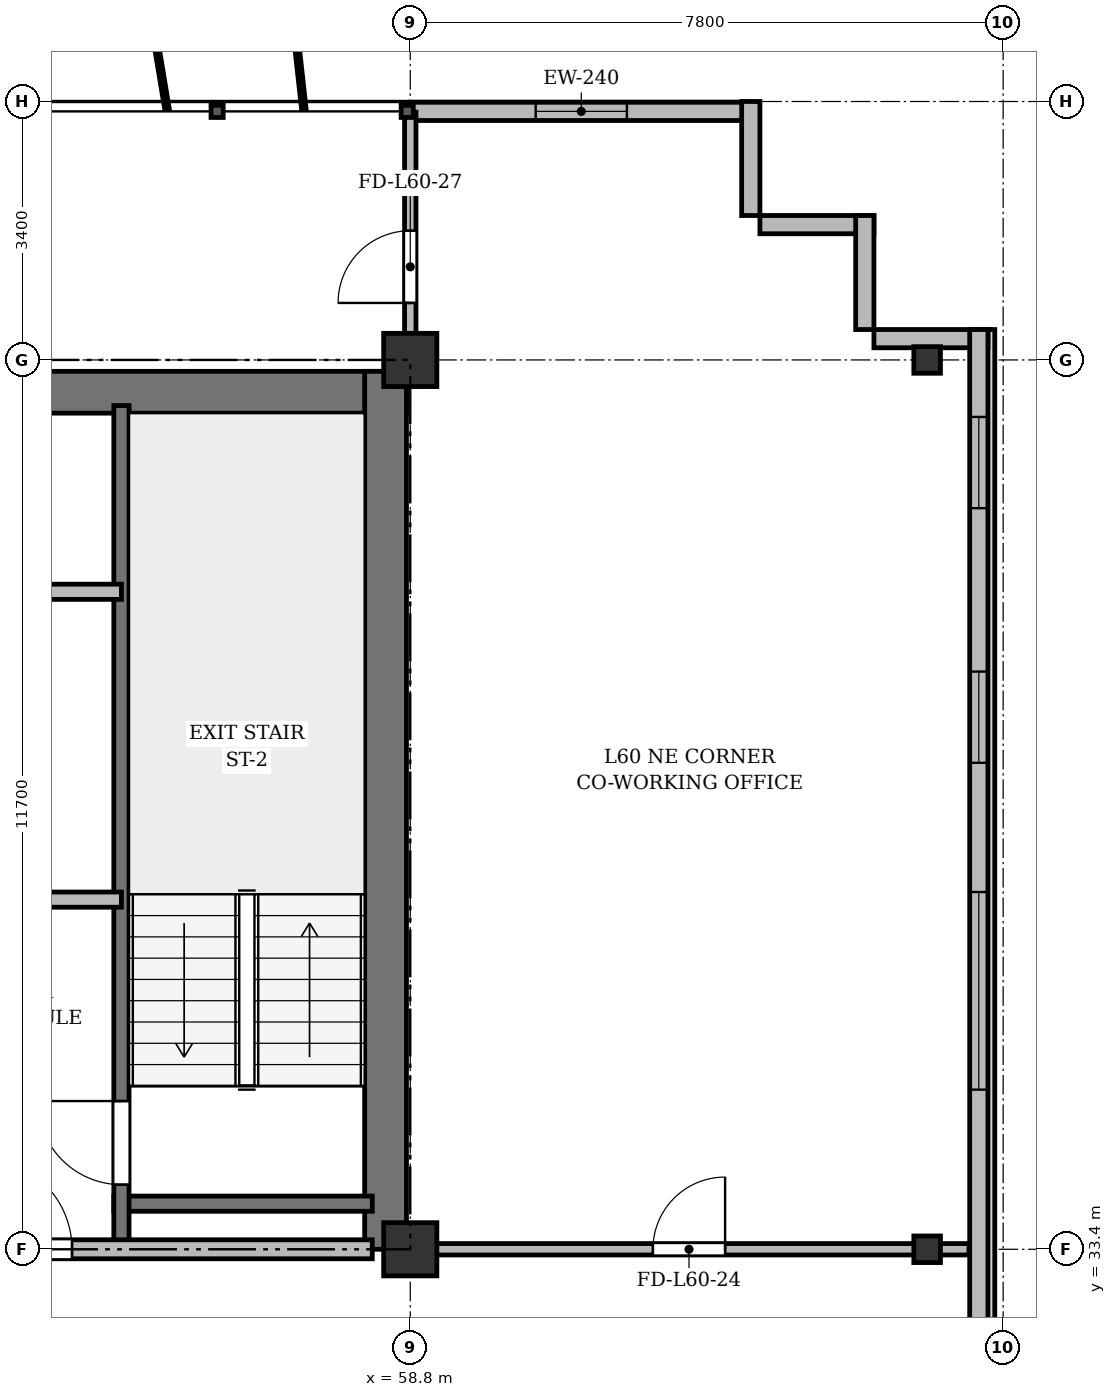
"""IFC4 building model, lengths in metres.
Left out: names, types, materials, properties, quantities, classifications, styles, units other than length and angle.
Written with IfcOpenShell. Run it as: python <this file> out.ifc"""

import sys

from ifc_helpers import new_model, si_unit, direction, frame, frame_2d, origin, origin_2d, place, context, subcontext, project, spatial, rectangle, i_section, extrude, source, transform, mapped, element, fill, save


model = new_model("IFC4")
c1 = context("Model", 3, precision=1e-05, world=origin(), true_north=direction((0.0, 1.0)))
c2 = subcontext(c1, "Body", "Model", "MODEL_VIEW")
j1 = project(units=[si_unit("LENGTHUNIT", "METRE"), si_unit("PLANEANGLEUNIT", "RADIAN")], contexts=[c1])
p1 = place(None, origin())
s1 = spatial("IfcSite", under=j1, at=p1, CompositionType="ELEMENT")
p2 = place(p1, origin())
s2 = spatial("IfcBuilding", under=s1, at=p2, CompositionType="ELEMENT")
p3 = place(p2, frame((0.0, 0.0, 230.1)))
s3 = spatial("IfcBuildingStorey", under=s2, at=p3, CompositionType="ELEMENT", Elevation=230.1)
m1 = source(origin(), c2, "Body", "SweptSolid", [
    extrude(rectangle(XDim=0.7, YDim=0.7, at=origin_2d()), origin(), (0.0, 0.0, 1.0), 3.6),
])
for number, where, z_axis, x_axis in (
    (1, (58.8, 33.4, 0.0), (0.0, 0.0, 1.0), (1.0, 0.0, 0.0)),
    (2, (58.8, 45.1, 0.0), (0.0, 0.0, 1.0), (1.0, 0.0, 0.0)),
):
    element("IfcColumn", number, at=place(p3, frame(where, z_axis=z_axis, x_axis=x_axis)), inside=s3, PredefinedType="COLUMN", context=c2, shape_type="MappedRepresentation", body=[
        mapped(m1, transform((0.0, 0.0, 0.0), x_axis=(1.0, 0.0, 0.0), y_axis=(0.0, 1.0, 0.0), z_axis=(0.0, 0.0, 1.0), scale=1.0)),
    ])
m2 = source(origin(), c2, "Body", "SweptSolid", [
    extrude(i_section(OverallWidth=0.35, OverallDepth=0.35, WebThickness=0.018, FlangeThickness=0.028, at=origin_2d()), origin(), (0.0, 0.0, 1.0), 3.6),
])
for number, where, z_axis, x_axis in (
    (3, (65.6, 33.4, 0.0), (0.0, 0.0, 1.0), (1.0, 0.0, 0.0)),
    (4, (65.6, 45.1, 0.0), (0.0, 0.0, 1.0), (1.0, 0.0, 0.0)),
):
    element("IfcColumn", number, at=place(p3, frame(where, z_axis=z_axis, x_axis=x_axis)), inside=s3, PredefinedType="COLUMN", context=c2, shape_type="MappedRepresentation", body=[
        mapped(m2, transform((0.0, 0.0, 0.0), x_axis=(1.0, 0.0, 0.0), y_axis=(0.0, 1.0, 0.0), z_axis=(0.0, 0.0, 1.0), scale=1.0)),
    ])
p4 = place(p3, frame((58.8, 48.37, 0.0), z_axis=(0.0, 0.0, 1.0), x_axis=(1.0, 0.0, 0.0)))
e5 = element("IfcWall", 5, at=p4, inside=s3, PredefinedType="SOLIDWALL", context=c2, shape_type="SweptSolid", body=[
    extrude(rectangle(XDim=4.5, YDim=0.24, at=frame_2d((2.25, 0.0))), origin(), (0.0, 0.0, 1.0), 3.36),
])
p5 = place(p4, frame((1.65, 0.0, 0.9)))
e6 = element("IfcOpeningElement", 6, at=p5, cuts=e5, PredefinedType="OPENING", context=c2, shape_type="SweptSolid", body=[
    extrude(rectangle(XDim=1.2, YDim=1.65, at=frame_2d((0.6, 0.825))), frame((0.0, 0.13, 0.0), z_axis=(0.0, -1.0, 0.0), x_axis=(1.0, 0.0, 0.0)), (0.0, 0.0, 1.0), 0.26),
])
for number, where, z_axis, x_axis in (
    (7, (63.28, 48.5, 0.0), (0.0, 0.0, 1.0), (0.0, -1.0, 0.0)),
    (8, (63.4, 46.88, 0.0), (0.0, 0.0, 1.0), (1.0, 0.0, 0.0)),
    (9, (64.78, 47.0, 0.0), (0.0, 0.0, 1.0), (0.0, -1.0, 0.0)),
    (10, (64.9, 45.38, 0.0), (0.0, 0.0, 1.0), (1.0, 0.0, 0.0)),
):
    element("IfcWall", number, at=place(p3, frame(where, z_axis=z_axis, x_axis=x_axis)), inside=s3, PredefinedType="SOLIDWALL", context=c2, shape_type="SweptSolid", body=[
        extrude(rectangle(XDim=1.5, YDim=0.24, at=frame_2d((0.75, 0.0))), origin(), (0.0, 0.0, 1.0), 3.36),
    ])
p6 = place(p3, frame((66.28, 45.5, 0.0), z_axis=(0.0, 0.0, 1.0), x_axis=(0.0, -1.0, 0.0)))
e11 = element("IfcWall", 11, at=p6, inside=s3, PredefinedType="SOLIDWALL", context=c2, shape_type="SweptSolid", body=[
    extrude(rectangle(XDim=39.1, YDim=0.24, at=frame_2d((19.55, 0.0))), origin(), (0.0, 0.0, 1.0), 3.36),
])
p7 = place(p6, frame((36.45, 0.0, 0.92)))
e12 = element("IfcOpeningElement", 12, at=p7, cuts=e11, PredefinedType="OPENING", context=c2, shape_type="SweptSolid", body=[
    extrude(rectangle(XDim=1.2, YDim=1.65, at=frame_2d((0.6, 0.825))), frame((0.0, 0.13, 0.0), z_axis=(0.0, -1.0, 0.0), x_axis=(1.0, 0.0, 0.0)), (0.0, 0.0, 1.0), 0.26),
])
p8 = place(p6, frame((32.8, 0.0, 0.92)))
e13 = element("IfcOpeningElement", 13, at=p8, cuts=e11, PredefinedType="OPENING", context=c2, shape_type="SweptSolid", body=[
    extrude(rectangle(XDim=2.6, YDim=1.9, at=frame_2d((1.3, 0.95))), frame((0.0, 0.13, 0.0), z_axis=(0.0, -1.0, 0.0), x_axis=(1.0, 0.0, 0.0)), (0.0, 0.0, 1.0), 0.26),
])
p9 = place(p6, frame((28.6, 0.0, 0.92)))
e14 = element("IfcOpeningElement", 14, at=p9, cuts=e11, PredefinedType="OPENING", context=c2, shape_type="SweptSolid", body=[
    extrude(rectangle(XDim=2.6, YDim=1.9, at=frame_2d((1.3, 0.95))), frame((0.0, 0.13, 0.0), z_axis=(0.0, -1.0, 0.0), x_axis=(1.0, 0.0, 0.0)), (0.0, 0.0, 1.0), 0.26),
])
p10 = place(p6, frame((21.4, 0.0, 0.92)))
e15 = element("IfcOpeningElement", 15, at=p10, cuts=e11, PredefinedType="OPENING", context=c2, shape_type="SweptSolid", body=[
    extrude(rectangle(XDim=2.6, YDim=1.9, at=frame_2d((1.3, 0.95))), frame((0.0, 0.13, 0.0), z_axis=(0.0, -1.0, 0.0), x_axis=(1.0, 0.0, 0.0)), (0.0, 0.0, 1.0), 0.26),
])
p11 = place(p6, frame((7.4, 0.0, 0.92)))
e16 = element("IfcOpeningElement", 16, at=p11, cuts=e11, PredefinedType="OPENING", context=c2, shape_type="SweptSolid", body=[
    extrude(rectangle(XDim=2.6, YDim=1.9, at=frame_2d((1.3, 0.95))), frame((0.0, 0.13, 0.0), z_axis=(0.0, -1.0, 0.0), x_axis=(1.0, 0.0, 0.0)), (0.0, 0.0, 1.0), 0.26),
])
p12 = place(p6, frame((4.5, 0.0, 0.92)))
e17 = element("IfcOpeningElement", 17, at=p12, cuts=e11, PredefinedType="OPENING", context=c2, shape_type="SweptSolid", body=[
    extrude(rectangle(XDim=1.2, YDim=1.65, at=frame_2d((0.6, 0.825))), frame((0.0, 0.13, 0.0), z_axis=(0.0, -1.0, 0.0), x_axis=(1.0, 0.0, 0.0)), (0.0, 0.0, 1.0), 0.26),
])
p13 = place(p6, frame((1.15, 0.0, 0.92)))
e18 = element("IfcOpeningElement", 18, at=p13, cuts=e11, PredefinedType="OPENING", context=c2, shape_type="SweptSolid", body=[
    extrude(rectangle(XDim=1.2, YDim=1.65, at=frame_2d((0.6, 0.825))), frame((0.0, 0.13, 0.0), z_axis=(0.0, -1.0, 0.0), x_axis=(1.0, 0.0, 0.0)), (0.0, 0.0, 1.0), 0.26),
])
p14 = place(p3, frame((15.65, 44.675, 0.0), z_axis=(0.0, 0.0, 1.0), x_axis=(1.0, 0.0, 0.0)))
e19 = element("IfcWall", 19, at=p14, inside=s3, PredefinedType="SHEAR", context=c2, shape_type="SweptSolid", body=[
    extrude(rectangle(XDim=43.1, YDim=0.55, at=frame_2d((21.55, 0.0))), origin(), (0.0, 0.0, 1.0), 3.36),
])
p15 = place(p3, frame((58.475, 33.4, 0.0), z_axis=(0.0, 0.0, 1.0), x_axis=(0.0, 1.0, 0.0)))
e20 = element("IfcWall", 20, at=p15, inside=s3, PredefinedType="SHEAR", context=c2, shape_type="SweptSolid", body=[
    extrude(rectangle(XDim=11.55, YDim=0.55, at=frame_2d((5.775, 0.0))), origin(), (0.0, 0.0, 1.0), 3.36),
])
p16 = place(p3, frame((54.9, 34.0, 0.0), z_axis=(0.0, 0.0, 1.0), x_axis=(1.0, 0.0, 0.0)))
e21 = element("IfcWall", 21, at=p16, inside=s3, PredefinedType="SHEAR", context=c2, shape_type="SweptSolid", body=[
    extrude(rectangle(XDim=3.4, YDim=0.2, at=frame_2d((1.7, 0.0))), origin(), (0.0, 0.0, 1.0), 3.36),
])
p17 = place(p3, frame((55.0, 33.4, 0.0), z_axis=(0.0, 0.0, 1.0), x_axis=(0.0, 1.0, 0.0)))
e22 = element("IfcWall", 22, at=p17, inside=s3, PredefinedType="SHEAR", context=c2, shape_type="SweptSolid", body=[
    extrude(rectangle(XDim=11.1, YDim=0.2, at=frame_2d((5.55, 0.0))), origin(), (0.0, 0.0, 1.0), 3.36),
])
p18 = place(p17, frame((0.85, 0.0, 0.0)))
e23 = element("IfcOpeningElement", 23, at=p18, cuts=e22, PredefinedType="OPENING", context=c2, shape_type="SweptSolid", body=[
    extrude(rectangle(XDim=1.1, YDim=2.15, at=frame_2d((0.55, 1.075))), frame((0.0, 0.11, 0.0), z_axis=(0.0, -1.0, 0.0), x_axis=(1.0, 0.0, 0.0)), (0.0, 0.0, 1.0), 0.22),
])
p19 = place(p3, frame((47.15, 42.05, 0.0), z_axis=(0.0, 0.0, 1.0), x_axis=(1.0, 0.0, 0.0)))
e24 = element("IfcWall", 24, at=p19, inside=s3, PredefinedType="SOLIDWALL", context=c2, shape_type="SweptSolid", body=[
    extrude(rectangle(XDim=7.85, YDim=0.2, at=frame_2d((3.925, 0.0))), origin(), (0.0, 0.0, 1.0), 2.86),
])
p20 = place(p19, frame((0.75, 0.0, 0.0)))
e25 = element("IfcOpeningElement", 25, at=p20, cuts=e24, PredefinedType="OPENING", context=c2, shape_type="SweptSolid", body=[
    extrude(rectangle(XDim=0.9, YDim=2.1, at=frame_2d((0.45, 1.05))), frame((0.0, 0.11, 0.0), z_axis=(0.0, -1.0, 0.0), x_axis=(1.0, 0.0, 0.0)), (0.0, 0.0, 1.0), 0.22),
])
p21 = place(p19, frame((3.85, 0.0, 0.0)))
e26 = element("IfcOpeningElement", 26, at=p21, cuts=e24, PredefinedType="OPENING", context=c2, shape_type="SweptSolid", body=[
    extrude(rectangle(XDim=0.9, YDim=2.1, at=frame_2d((0.45, 1.05))), frame((0.0, 0.11, 0.0), z_axis=(0.0, -1.0, 0.0), x_axis=(1.0, 0.0, 0.0)), (0.0, 0.0, 1.0), 0.22),
])
p22 = place(p3, frame((52.45, 38.0, 0.0), z_axis=(0.0, 0.0, 1.0), x_axis=(1.0, 0.0, 0.0)))
e27 = element("IfcWall", 27, at=p22, inside=s3, PredefinedType="PARTITIONING", context=c2, shape_type="SweptSolid", body=[
    extrude(rectangle(XDim=2.55, YDim=0.2, at=frame_2d((1.275, 0.0))), origin(), (0.0, 0.0, 1.0), 3.36),
])
p23 = place(p3, frame((47.15, 33.4, 0.0), z_axis=(0.0, 0.0, 1.0), x_axis=(1.0, 0.0, 0.0)))
e28 = element("IfcWall", 28, at=p23, inside=s3, PredefinedType="PARTITIONING", context=c2, shape_type="SweptSolid", body=[
    extrude(rectangle(XDim=11.15, YDim=0.25, at=frame_2d((5.575, 0.0))), origin(), (0.0, 0.0, 1.0), 2.91),
])
p24 = place(p23, frame((0.7, 0.0, 0.0)))
e29 = element("IfcOpeningElement", 29, at=p24, cuts=e28, PredefinedType="OPENING", context=c2, shape_type="SweptSolid", body=[
    extrude(rectangle(XDim=0.95, YDim=2.15, at=frame_2d((0.475, 1.075))), frame((0.0, 0.135, 0.0), z_axis=(0.0, -1.0, 0.0), x_axis=(1.0, 0.0, 0.0)), (0.0, 0.0, 1.0), 0.27),
])
p25 = place(p23, frame((6.0, 0.0, 0.0)))
e30 = element("IfcOpeningElement", 30, at=p25, cuts=e28, PredefinedType="OPENING", context=c2, shape_type="SweptSolid", body=[
    extrude(rectangle(XDim=1.2, YDim=2.15, at=frame_2d((0.6, 1.075))), frame((0.0, 0.135, 0.0), z_axis=(0.0, -1.0, 0.0), x_axis=(1.0, 0.0, 0.0)), (0.0, 0.0, 1.0), 0.27),
])
p26 = place(p3, frame((58.8, 33.4, 0.0), z_axis=(0.0, 0.0, 1.0), x_axis=(1.0, 0.0, 0.0)))
e31 = element("IfcWall", 31, at=p26, inside=s3, PredefinedType="PARTITIONING", context=c2, shape_type="SweptSolid", body=[
    extrude(rectangle(XDim=7.35, YDim=0.15, at=frame_2d((3.675, 0.0))), origin(), (0.0, 0.0, 1.0), 2.91),
])
p27 = place(p26, frame((3.192, 0.0, 0.0)))
e32 = element("IfcOpeningElement", 32, at=p27, cuts=e31, PredefinedType="OPENING", context=c2, shape_type="SweptSolid", body=[
    extrude(rectangle(XDim=0.95, YDim=2.15, at=frame_2d((0.475, 1.075))), frame((0.0, 0.085, 0.0), z_axis=(0.0, -1.0, 0.0), x_axis=(1.0, 0.0, 0.0)), (0.0, 0.0, 1.0), 0.17),
])
p28 = place(p3, frame((58.8, 44.75, 0.0), z_axis=(0.0, 0.0, 1.0), x_axis=(0.0, 1.0, 0.0)))
e33 = element("IfcWall", 33, at=p28, inside=s3, PredefinedType="PARTITIONING", context=c2, shape_type="SweptSolid", body=[
    extrude(rectangle(XDim=3.61, YDim=0.15, at=frame_2d((1.805, 0.0))), origin(), (0.0, 0.0, 1.0), 2.86),
])
p29 = place(p28, frame((1.1, 0.0, 0.0)))
e34 = element("IfcOpeningElement", 34, at=p29, cuts=e33, PredefinedType="OPENING", context=c2, shape_type="SweptSolid", body=[
    extrude(rectangle(XDim=0.95, YDim=2.15, at=frame_2d((0.475, 1.075))), frame((0.0, 0.085, 0.0), z_axis=(0.0, -1.0, 0.0), x_axis=(1.0, 0.0, 0.0)), (0.0, 0.0, 1.0), 0.17),
])
m3 = source(origin(), c2, "Body", "SweptSolid", [
    extrude(rectangle(XDim=1.2, YDim=1.65, at=frame_2d((0.6, 0.825))), frame((0.0, 0.03, 0.0), z_axis=(0.0, -1.0, 0.0), x_axis=(1.0, 0.0, 0.0)), (0.0, 0.0, 1.0), 0.06),
])
p30 = place(p5, origin())
e35 = element("IfcWindow", 35, at=p30, inside=s3, PartitioningType="SINGLE_PANEL", PredefinedType="WINDOW", context=c2, shape_type="MappedRepresentation", body=[
    mapped(m3, transform((0.0, 0.0, 0.0), x_axis=(1.0, 0.0, 0.0), y_axis=(0.0, 1.0, 0.0), z_axis=(0.0, 0.0, 1.0), scale=1.0)),
])
fill(e6, e35)
m4 = source(origin(), c2, "Body", "SweptSolid", [
    extrude(rectangle(XDim=2.6, YDim=1.9, at=frame_2d((1.3, 0.95))), frame((0.0, 0.03, 0.0), z_axis=(0.0, -1.0, 0.0), x_axis=(1.0, 0.0, 0.0)), (0.0, 0.0, 1.0), 0.06),
])
p31 = place(p11, origin())
e36 = element("IfcWindow", 36, at=p31, inside=s3, PartitioningType="SINGLE_PANEL", PredefinedType="WINDOW", context=c2, shape_type="MappedRepresentation", body=[
    mapped(m4, transform((0.0, 0.0, 0.0), x_axis=(1.0, 0.0, 0.0), y_axis=(0.0, 1.0, 0.0), z_axis=(0.0, 0.0, 1.0), scale=1.0)),
])
fill(e16, e36)
p32 = place(p12, origin())
e37 = element("IfcWindow", 37, at=p32, inside=s3, PartitioningType="SINGLE_PANEL", PredefinedType="WINDOW", context=c2, shape_type="MappedRepresentation", body=[
    mapped(m3, transform((0.0, 0.0, 0.0), x_axis=(1.0, 0.0, 0.0), y_axis=(0.0, 1.0, 0.0), z_axis=(0.0, 0.0, 1.0), scale=1.0)),
])
fill(e17, e37)
p33 = place(p13, origin())
e38 = element("IfcWindow", 38, at=p33, inside=s3, PartitioningType="SINGLE_PANEL", PredefinedType="WINDOW", context=c2, shape_type="MappedRepresentation", body=[
    mapped(m3, transform((0.0, 0.0, 0.0), x_axis=(1.0, 0.0, 0.0), y_axis=(0.0, 1.0, 0.0), z_axis=(0.0, 0.0, 1.0), scale=1.0)),
])
fill(e18, e38)
m5 = source(origin(), c2, "Body", "SweptSolid", [
    extrude(rectangle(XDim=1.1, YDim=2.15, at=frame_2d((0.55, 1.075))), frame((0.0, 0.025, 0.0), z_axis=(0.0, -1.0, 0.0), x_axis=(1.0, 0.0, 0.0)), (0.0, 0.0, 1.0), 0.05),
])
p34 = place(p18, origin())
e39 = element("IfcDoor", 39, at=p34, inside=s3, OperationType="SINGLE_SWING_RIGHT", PredefinedType="DOOR", context=c2, shape_type="MappedRepresentation", body=[
    mapped(m5, transform((0.0, 0.0, 0.0), x_axis=(1.0, 0.0, 0.0), y_axis=(0.0, 1.0, 0.0), z_axis=(0.0, 0.0, 1.0), scale=1.0)),
])
fill(e23, e39)
m6 = source(origin(), c2, "Body", "SweptSolid", [
    extrude(rectangle(XDim=1.2, YDim=2.15, at=frame_2d((0.6, 1.075))), frame((0.0, 0.025, 0.0), z_axis=(0.0, -1.0, 0.0), x_axis=(1.0, 0.0, 0.0)), (0.0, 0.0, 1.0), 0.05),
])
p35 = place(p25, origin())
e40 = element("IfcDoor", 40, at=p35, inside=s3, OperationType="SINGLE_SWING_LEFT", PredefinedType="DOOR", context=c2, shape_type="MappedRepresentation", body=[
    mapped(m6, transform((0.0, 0.0, 0.0), x_axis=(1.0, 0.0, 0.0), y_axis=(0.0, 1.0, 0.0), z_axis=(0.0, 0.0, 1.0), scale=1.0)),
])
fill(e30, e40)
m7 = source(origin(), c2, "Body", "SweptSolid", [
    extrude(rectangle(XDim=0.95, YDim=2.15, at=frame_2d((0.475, 1.075))), frame((0.0, 0.025, 0.0), z_axis=(0.0, -1.0, 0.0), x_axis=(1.0, 0.0, 0.0)), (0.0, 0.0, 1.0), 0.05),
])
p36 = place(p27, origin())
e41 = element("IfcDoor", 41, at=p36, inside=s3, OperationType="SINGLE_SWING_RIGHT", PredefinedType="DOOR", context=c2, shape_type="MappedRepresentation", body=[
    mapped(m7, transform((0.0, 0.0, 0.0), x_axis=(1.0, 0.0, 0.0), y_axis=(0.0, 1.0, 0.0), z_axis=(0.0, 0.0, 1.0), scale=1.0)),
])
fill(e32, e41)
p37 = place(p29, origin())
e42 = element("IfcDoor", 42, at=p37, inside=s3, OperationType="SINGLE_SWING_LEFT", PredefinedType="DOOR", context=c2, shape_type="MappedRepresentation", body=[
    mapped(m7, transform((0.0, 0.0, 0.0), x_axis=(1.0, 0.0, 0.0), y_axis=(0.0, 1.0, 0.0), z_axis=(0.0, 0.0, 1.0), scale=1.0)),
])
fill(e34, e42)
save(model, sys.argv[1])
